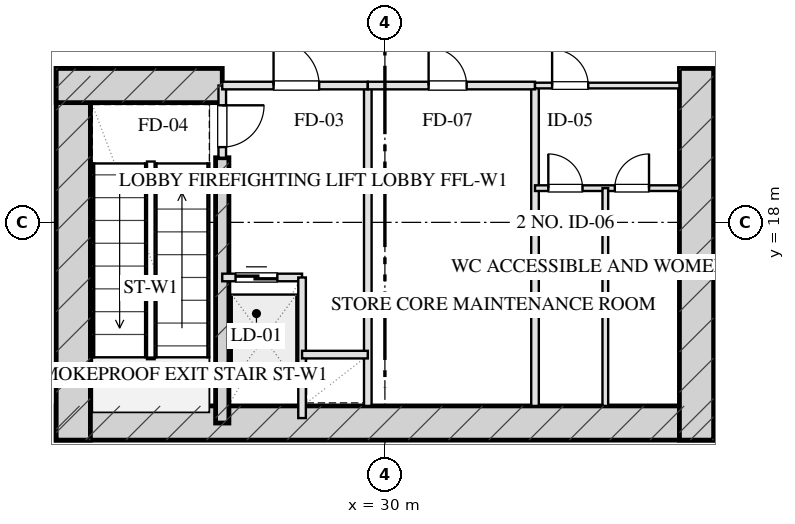
"""IFC4 building model, lengths in metres.
Left out: names, types, materials, properties, quantities, classifications, styles, units other than length and angle.
Written with IfcOpenShell. Run it as: python <this file> out.ifc"""

import sys

from ifc_helpers import new_model, si_unit, direction, frame, frame_2d, origin, place, context, subcontext, project, spatial, rectangle, extrude, element, fill, save


model = new_model("IFC4")
c1 = context("Model", 3, precision=1e-05, world=origin(), true_north=direction((0.0, 1.0)))
c2 = subcontext(c1, "Body", "Model", "MODEL_VIEW")
j1 = project(units=[si_unit("LENGTHUNIT", "METRE"), si_unit("PLANEANGLEUNIT", "RADIAN")], contexts=[c1])
p1 = place(None, origin())
s1 = spatial("IfcSite", under=j1, at=p1, CompositionType="ELEMENT")
p2 = place(p1, origin())
s2 = spatial("IfcBuilding", under=s1, at=p2, CompositionType="ELEMENT")
p3 = place(p2, frame((0.0, 0.0, -6.0)))
s3 = spatial("IfcBuildingStorey", under=s2, at=p3, CompositionType="ELEMENT", Elevation=-6.0)
p4 = place(p3, frame((21.35, 12.72, 0.0), z_axis=(0.0, 0.0, 1.0), x_axis=(1.0, 0.0, 0.0)))
e1 = element("IfcWall", 1, at=p4, inside=s3, PredefinedType="SHEAR", context=c2, shape_type="SweptSolid", body=[
    extrude(rectangle(XDim=17.3, YDim=0.9, at=frame_2d((8.65, 0.0))), origin(), (0.0, 0.0, 1.0), 6.0),
])
for number, where, z_axis, x_axis in (
    (2, (21.8, 22.05, 0.0), (0.0, 0.0, 1.0), (0.0, -1.0, 0.0)),
    (3, (38.2, 22.05, 0.0), (0.0, 0.0, 1.0), (0.0, -1.0, 0.0)),
):
    element("IfcWall", number, at=place(p3, frame(where, z_axis=z_axis, x_axis=x_axis)), inside=s3, PredefinedType="SHEAR", context=c2, shape_type="SweptSolid", body=[
        extrude(rectangle(XDim=9.78, YDim=0.9, at=frame_2d((4.89, 0.0))), origin(), (0.0, 0.0, 1.0), 6.0),
    ])
p5 = place(p3, frame((25.72, 19.7, 0.0), z_axis=(0.0, 0.0, 1.0), x_axis=(0.0, -1.0, 0.0)))
e4 = element("IfcWall", 4, at=p5, inside=s3, PredefinedType="SHEAR", context=c2, shape_type="SweptSolid", body=[
    extrude(rectangle(XDim=6.98, YDim=0.35, at=frame_2d((3.49, 0.0))), origin(), (0.0, 0.0, 1.0), 6.0),
])
p6 = place(p3, frame((21.35, 21.6, 0.0), z_axis=(0.0, 0.0, 1.0), x_axis=(1.0, 0.0, 0.0)))
e5 = element("IfcWall", 5, at=p6, inside=s3, PredefinedType="SHEAR", context=c2, shape_type="SweptSolid", body=[
    extrude(rectangle(XDim=4.37, YDim=0.9, at=frame_2d((2.185, 0.0))), origin(), (0.0, 0.0, 1.0), 6.0),
])
p7 = place(p3, frame((25.72, 21.6, 0.0), z_axis=(0.0, 0.0, 1.0), x_axis=(0.0, -1.0, 0.0)))
e6 = element("IfcWall", 6, at=p7, inside=s3, PredefinedType="PARTITIONING", context=c2, shape_type="SweptSolid", body=[
    extrude(rectangle(XDim=1.9, YDim=0.2, at=frame_2d((0.95, 0.0))), origin(), (0.0, 0.0, 1.0), 5.685),
])
p8 = place(p7, frame((0.52, 0.0, 0.0)))
e7 = element("IfcOpeningElement", 7, at=p8, cuts=e6, PredefinedType="OPENING", context=c2, shape_type="SweptSolid", body=[
    extrude(rectangle(XDim=1.1, YDim=2.05, at=frame_2d((0.55, 1.025))), frame((0.0, 0.11, 0.0), z_axis=(0.0, -1.0, 0.0), x_axis=(1.0, 0.0, 0.0)), (0.0, 0.0, 1.0), 0.22),
])
p9 = place(p3, frame((29.55, 21.6, 0.0), z_axis=(0.0, 0.0, 1.0), x_axis=(0.0, -1.0, 0.0)))
e8 = element("IfcWall", 8, at=p9, inside=s3, PredefinedType="PARTITIONING", context=c2, shape_type="SweptSolid", body=[
    extrude(rectangle(XDim=8.43, YDim=0.2, at=frame_2d((4.215, 0.0))), origin(), (0.0, 0.0, 1.0), 5.685),
])
p10 = place(p3, frame((25.72, 21.6, 0.0), z_axis=(0.0, 0.0, 1.0), x_axis=(1.0, 0.0, 0.0)))
e9 = element("IfcWall", 9, at=p10, inside=s3, PredefinedType="PARTITIONING", context=c2, shape_type="SweptSolid", body=[
    extrude(rectangle(XDim=3.83, YDim=0.2, at=frame_2d((1.915, 0.0))), origin(), (0.0, 0.0, 1.0), 5.685),
])
p11 = place(p10, frame((1.35, 0.0, 0.0)))
e10 = element("IfcOpeningElement", 10, at=p11, cuts=e9, PredefinedType="OPENING", context=c2, shape_type="SweptSolid", body=[
    extrude(rectangle(XDim=1.2, YDim=2.05, at=frame_2d((0.6, 1.025))), frame((0.0, 0.11, 0.0), z_axis=(0.0, -1.0, 0.0), x_axis=(1.0, 0.0, 0.0)), (0.0, 0.0, 1.0), 0.22),
])
p12 = place(p3, frame((25.72, 16.55, 0.0), z_axis=(0.0, 0.0, 1.0), x_axis=(1.0, 0.0, 0.0)))
e11 = element("IfcWall", 11, at=p12, inside=s3, PredefinedType="PARTITIONING", context=c2, shape_type="SweptSolid", body=[
    extrude(rectangle(XDim=2.1, YDim=0.2, at=frame_2d((1.05, 0.0))), origin(), (0.0, 0.0, 1.0), 5.685),
])
p13 = place(p12, frame((0.35, 0.0, 0.0)))
e12 = element("IfcOpeningElement", 12, at=p13, cuts=e11, PredefinedType="OPENING", context=c2, shape_type="SweptSolid", body=[
    extrude(rectangle(XDim=1.1, YDim=2.05, at=frame_2d((0.55, 1.025))), frame((0.0, 0.11, 0.0), z_axis=(0.0, -1.0, 0.0), x_axis=(1.0, 0.0, 0.0)), (0.0, 0.0, 1.0), 0.22),
])
p14 = place(p3, frame((27.82, 16.55, 0.0), z_axis=(0.0, 0.0, 1.0), x_axis=(0.0, -1.0, 0.0)))
e13 = element("IfcWall", 13, at=p14, inside=s3, PredefinedType="PARTITIONING", context=c2, shape_type="SweptSolid", body=[
    extrude(rectangle(XDim=3.7, YDim=0.2, at=frame_2d((1.85, 0.0))), origin(), (0.0, 0.0, 1.0), 5.685),
])
p15 = place(p3, frame((27.82, 14.52, 0.0), z_axis=(0.0, 0.0, 1.0), x_axis=(1.0, 0.0, 0.0)))
e14 = element("IfcWall", 14, at=p15, inside=s3, PredefinedType="PARTITIONING", context=c2, shape_type="SweptSolid", body=[
    extrude(rectangle(XDim=1.73, YDim=0.2, at=frame_2d((0.865, 0.0))), origin(), (0.0, 0.0, 1.0), 5.685),
])
p16 = place(p3, frame((33.95, 21.6, 0.0), z_axis=(0.0, 0.0, 1.0), x_axis=(0.0, -1.0, 0.0)))
e15 = element("IfcWall", 15, at=p16, inside=s3, PredefinedType="PARTITIONING", context=c2, shape_type="SweptSolid", body=[
    extrude(rectangle(XDim=8.43, YDim=0.2, at=frame_2d((4.215, 0.0))), origin(), (0.0, 0.0, 1.0), 5.685),
])
p17 = place(p3, frame((29.55, 21.6, 0.0), z_axis=(0.0, 0.0, 1.0), x_axis=(1.0, 0.0, 0.0)))
e16 = element("IfcWall", 16, at=p17, inside=s3, PredefinedType="PARTITIONING", context=c2, shape_type="SweptSolid", body=[
    extrude(rectangle(XDim=4.4, YDim=0.2, at=frame_2d((2.2, 0.0))), origin(), (0.0, 0.0, 1.0), 5.685),
])
p18 = place(p17, frame((1.6, 0.0, 0.0)))
e17 = element("IfcOpeningElement", 17, at=p18, cuts=e16, PredefinedType="OPENING", context=c2, shape_type="SweptSolid", body=[
    extrude(rectangle(XDim=1.0, YDim=2.05, at=frame_2d((0.5, 1.025))), frame((0.0, 0.11, 0.0), z_axis=(0.0, -1.0, 0.0), x_axis=(1.0, 0.0, 0.0)), (0.0, 0.0, 1.0), 0.22),
])
p19 = place(p3, frame((33.95, 21.6, 0.0), z_axis=(0.0, 0.0, 1.0), x_axis=(1.0, 0.0, 0.0)))
e18 = element("IfcWall", 18, at=p19, inside=s3, PredefinedType="PARTITIONING", context=c2, shape_type="SweptSolid", body=[
    extrude(rectangle(XDim=3.8, YDim=0.15, at=frame_2d((1.9, 0.0))), origin(), (0.0, 0.0, 1.0), 5.685),
])
p20 = place(p19, frame((0.45, 0.0, 0.0)))
e19 = element("IfcOpeningElement", 19, at=p20, cuts=e18, PredefinedType="OPENING", context=c2, shape_type="SweptSolid", body=[
    extrude(rectangle(XDim=0.95, YDim=2.05, at=frame_2d((0.475, 1.025))), frame((0.0, 0.085, 0.0), z_axis=(0.0, -1.0, 0.0), x_axis=(1.0, 0.0, 0.0)), (0.0, 0.0, 1.0), 0.17),
])
p21 = place(p3, frame((33.95, 18.9, 0.0), z_axis=(0.0, 0.0, 1.0), x_axis=(1.0, 0.0, 0.0)))
e20 = element("IfcWall", 20, at=p21, inside=s3, PredefinedType="PARTITIONING", context=c2, shape_type="SweptSolid", body=[
    extrude(rectangle(XDim=3.8, YDim=0.15, at=frame_2d((1.9, 0.0))), origin(), (0.0, 0.0, 1.0), 5.685),
])
p22 = place(p21, frame((0.35, 0.0, 0.0)))
e21 = element("IfcOpeningElement", 21, at=p22, cuts=e20, PredefinedType="OPENING", context=c2, shape_type="SweptSolid", body=[
    extrude(rectangle(XDim=0.9, YDim=2.05, at=frame_2d((0.45, 1.025))), frame((0.0, 0.085, 0.0), z_axis=(0.0, -1.0, 0.0), x_axis=(1.0, 0.0, 0.0)), (0.0, 0.0, 1.0), 0.17),
])
p23 = place(p21, frame((2.1, 0.0, 0.0)))
e22 = element("IfcOpeningElement", 22, at=p23, cuts=e20, PredefinedType="OPENING", context=c2, shape_type="SweptSolid", body=[
    extrude(rectangle(XDim=0.9, YDim=2.05, at=frame_2d((0.45, 1.025))), frame((0.0, 0.085, 0.0), z_axis=(0.0, -1.0, 0.0), x_axis=(1.0, 0.0, 0.0)), (0.0, 0.0, 1.0), 0.17),
])
p24 = place(p3, frame((35.8, 18.9, 0.0), z_axis=(0.0, 0.0, 1.0), x_axis=(0.0, -1.0, 0.0)))
e23 = element("IfcWall", 23, at=p24, inside=s3, PredefinedType="PARTITIONING", context=c2, shape_type="SweptSolid", body=[
    extrude(rectangle(XDim=5.73, YDim=0.15, at=frame_2d((2.865, 0.0))), origin(), (0.0, 0.0, 1.0), 5.685),
])
p25 = place(p8, origin())
e24 = element("IfcDoor", 24, at=p25, inside=s3, OperationType="SINGLE_SWING_LEFT", PredefinedType="DOOR", context=c2, shape_type="SweptSolid", body=[
    extrude(rectangle(XDim=1.1, YDim=2.05, at=frame_2d((0.55, 1.025))), frame((0.0, 0.025, 0.0), z_axis=(0.0, -1.0, 0.0), x_axis=(1.0, 0.0, 0.0)), (0.0, 0.0, 1.0), 0.05),
])
fill(e7, e24)
p26 = place(p11, origin())
e25 = element("IfcDoor", 25, at=p26, inside=s3, OperationType="SINGLE_SWING_LEFT", PredefinedType="DOOR", context=c2, shape_type="SweptSolid", body=[
    extrude(rectangle(XDim=1.2, YDim=2.05, at=frame_2d((0.6, 1.025))), frame((0.0, 0.025, 0.0), z_axis=(0.0, -1.0, 0.0), x_axis=(1.0, 0.0, 0.0)), (0.0, 0.0, 1.0), 0.05),
])
fill(e10, e25)
p27 = place(p13, origin())
e26 = element("IfcDoor", 26, at=p27, inside=s3, OperationType="DOUBLE_DOOR_SLIDING", PredefinedType="DOOR", context=c2, shape_type="SweptSolid", body=[
    extrude(rectangle(XDim=1.1, YDim=2.05, at=frame_2d((0.55, 1.025))), frame((0.0, 0.025, 0.0), z_axis=(0.0, -1.0, 0.0), x_axis=(1.0, 0.0, 0.0)), (0.0, 0.0, 1.0), 0.05),
])
fill(e12, e26)
p28 = place(p18, origin())
e27 = element("IfcDoor", 27, at=p28, inside=s3, OperationType="SINGLE_SWING_LEFT", PredefinedType="DOOR", context=c2, shape_type="SweptSolid", body=[
    extrude(rectangle(XDim=1.0, YDim=2.05, at=frame_2d((0.5, 1.025))), frame((0.0, 0.025, 0.0), z_axis=(0.0, -1.0, 0.0), x_axis=(1.0, 0.0, 0.0)), (0.0, 0.0, 1.0), 0.05),
])
fill(e17, e27)
p29 = place(p20, origin())
e28 = element("IfcDoor", 28, at=p29, inside=s3, OperationType="SINGLE_SWING_LEFT", PredefinedType="DOOR", context=c2, shape_type="SweptSolid", body=[
    extrude(rectangle(XDim=0.95, YDim=2.05, at=frame_2d((0.475, 1.025))), frame((0.0, 0.025, 0.0), z_axis=(0.0, -1.0, 0.0), x_axis=(1.0, 0.0, 0.0)), (0.0, 0.0, 1.0), 0.05),
])
fill(e19, e28)
p30 = place(p22, origin())
e29 = element("IfcDoor", 29, at=p30, inside=s3, OperationType="SINGLE_SWING_LEFT", PredefinedType="DOOR", context=c2, shape_type="SweptSolid", body=[
    extrude(rectangle(XDim=0.9, YDim=2.05, at=frame_2d((0.45, 1.025))), frame((0.0, 0.025, 0.0), z_axis=(0.0, -1.0, 0.0), x_axis=(1.0, 0.0, 0.0)), (0.0, 0.0, 1.0), 0.05),
])
fill(e21, e29)
p31 = place(p23, origin())
e30 = element("IfcDoor", 30, at=p31, inside=s3, OperationType="SINGLE_SWING_RIGHT", PredefinedType="DOOR", context=c2, shape_type="SweptSolid", body=[
    extrude(rectangle(XDim=0.9, YDim=2.05, at=frame_2d((0.45, 1.025))), frame((0.0, 0.025, 0.0), z_axis=(0.0, -1.0, 0.0), x_axis=(1.0, 0.0, 0.0)), (0.0, 0.0, 1.0), 0.05),
])
fill(e22, e30)
save(model, sys.argv[1])
